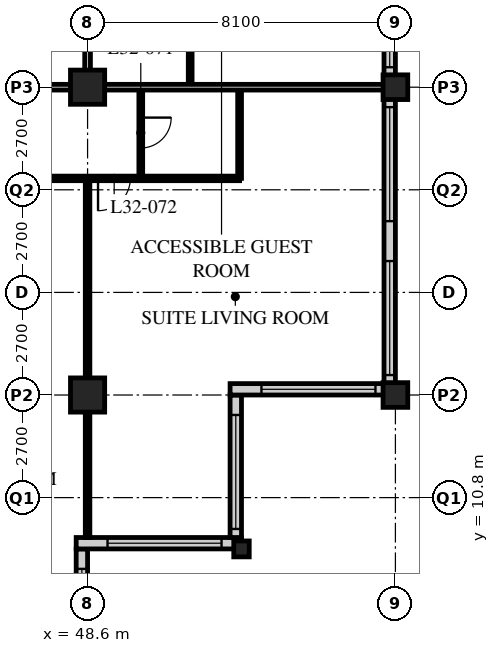
"""IFC4 building model, lengths in metres.
Left out: names, types, materials, properties, quantities, classifications, styles, units other than length and angle.
Written with IfcOpenShell. Run it as: python <this file> out.ifc"""

import sys

from ifc_helpers import new_model, si_unit, direction, frame, frame_2d, origin, origin_2d, place, context, subcontext, project, spatial, rectangle, hollow_rectangle, i_section, extrude, element, fill, save


model = new_model("IFC4")
c1 = context("Model", 3, precision=1e-05, world=origin(), true_north=direction((0.0, 1.0)))
c2 = subcontext(c1, "Body", "Model", "MODEL_VIEW")
j1 = project(units=[si_unit("LENGTHUNIT", "METRE"), si_unit("PLANEANGLEUNIT", "RADIAN")], contexts=[c1])
p1 = place(None, origin())
s1 = spatial("IfcSite", under=j1, at=p1, CompositionType="ELEMENT")
p2 = place(p1, origin())
s2 = spatial("IfcBuilding", under=s1, at=p2, CompositionType="ELEMENT")
p3 = place(p2, frame((0.0, 0.0, 127.2)))
s3 = spatial("IfcBuildingStorey", under=s2, at=p3, CompositionType="ELEMENT", Elevation=127.2)
for number, where, z_axis, x_axis in (
    (1, (48.6, 13.5, 0.0), (0.0, 0.0, 1.0), (1.0, 0.0, 0.0)),
    (2, (48.6, 21.6, 0.0), (0.0, 0.0, 1.0), (1.0, 0.0, 0.0)),
):
    element("IfcColumn", number, at=place(p3, frame(where, z_axis=z_axis, x_axis=x_axis)), inside=s3, PredefinedType="COLUMN", context=c2, shape_type="SweptSolid", body=[
        extrude(hollow_rectangle(XDim=0.9, YDim=0.9, WallThickness=0.09, at=origin_2d()), origin(), (0.0, 0.0, 1.0), 3.4),
    ])
p4 = place(p3, frame((52.65, 9.45, 0.0), z_axis=(0.0, 0.0, 1.0), x_axis=(1.0, 0.0, 0.0)))
e3 = element("IfcColumn", 3, at=p4, inside=s3, PredefinedType="COLUMN", context=c2, shape_type="SweptSolid", body=[
    extrude(i_section(OverallWidth=0.407, OverallDepth=0.419, WebThickness=0.031, FlangeThickness=0.049, FilletRadius=0.015, at=origin_2d()), origin(), (0.0, 0.0, 1.0), 3.4),
])
for number, where, z_axis, x_axis in (
    (4, (56.7, 13.5, 0.0), (0.0, 0.0, 1.0), (1.0, 0.0, 0.0)),
    (5, (56.7, 21.6, 0.0), (0.0, 0.0, 1.0), (1.0, 0.0, 0.0)),
):
    element("IfcColumn", number, at=place(p3, frame(where, z_axis=z_axis, x_axis=x_axis)), inside=s3, PredefinedType="COLUMN", context=c2, shape_type="SweptSolid", body=[
        extrude(hollow_rectangle(XDim=0.65, YDim=0.65, WallThickness=0.055, at=origin_2d()), origin(), (0.0, 0.0, 1.0), 3.4),
    ])
p5 = place(p3, frame((48.45, 5.7, 0.0), z_axis=(0.0, 0.0, 1.0), x_axis=(0.0, 1.0, 0.0)))
e6 = element("IfcWall", 6, at=p5, inside=s3, PredefinedType="SOLIDWALL", context=c2, shape_type="SweptSolid", body=[
    extrude(rectangle(XDim=3.75, YDim=0.3, at=frame_2d((1.875, 0.0))), origin(), (0.0, 0.0, 1.0), 3.19),
])
p6 = place(p5, frame((0.225, 0.0, 0.9)))
e7 = element("IfcOpeningElement", 7, at=p6, cuts=e6, PredefinedType="OPENING", context=c2, shape_type="SweptSolid", body=[
    extrude(rectangle(XDim=3.0, YDim=1.5, at=frame_2d((1.5, 0.75))), frame((0.0, 0.16, 0.0), z_axis=(0.0, -1.0, 0.0), x_axis=(1.0, 0.0, 0.0)), (0.0, 0.0, 1.0), 0.32),
])
p7 = place(p3, frame((48.3, 9.6, 0.0), z_axis=(0.0, 0.0, 1.0), x_axis=(1.0, 0.0, 0.0)))
e8 = element("IfcWall", 8, at=p7, inside=s3, PredefinedType="SOLIDWALL", context=c2, shape_type="SweptSolid", body=[
    extrude(rectangle(XDim=4.35, YDim=0.3, at=frame_2d((2.175, 0.0))), origin(), (0.0, 0.0, 1.0), 3.19),
])
p8 = place(p7, frame((0.825, 0.0, 0.9)))
e9 = element("IfcOpeningElement", 9, at=p8, cuts=e8, PredefinedType="OPENING", context=c2, shape_type="SweptSolid", body=[
    extrude(rectangle(XDim=3.0, YDim=1.5, at=frame_2d((1.5, 0.75))), frame((0.0, 0.16, 0.0), z_axis=(0.0, -1.0, 0.0), x_axis=(1.0, 0.0, 0.0)), (0.0, 0.0, 1.0), 0.32),
])
p9 = place(p3, frame((52.5, 9.75, 0.0), z_axis=(0.0, 0.0, 1.0), x_axis=(0.0, 1.0, 0.0)))
e10 = element("IfcWall", 10, at=p9, inside=s3, PredefinedType="SOLIDWALL", context=c2, shape_type="SweptSolid", body=[
    extrude(rectangle(XDim=3.75, YDim=0.3, at=frame_2d((1.875, 0.0))), origin(), (0.0, 0.0, 1.0), 3.19),
])
p10 = place(p9, frame((0.225, 0.0, 0.9)))
e11 = element("IfcOpeningElement", 11, at=p10, cuts=e10, PredefinedType="OPENING", context=c2, shape_type="SweptSolid", body=[
    extrude(rectangle(XDim=3.0, YDim=1.5, at=frame_2d((1.5, 0.75))), frame((0.0, 0.16, 0.0), z_axis=(0.0, -1.0, 0.0), x_axis=(1.0, 0.0, 0.0)), (0.0, 0.0, 1.0), 0.32),
])
p11 = place(p3, frame((52.35, 13.65, 0.0), z_axis=(0.0, 0.0, 1.0), x_axis=(1.0, 0.0, 0.0)))
e12 = element("IfcWall", 12, at=p11, inside=s3, PredefinedType="SOLIDWALL", context=c2, shape_type="SweptSolid", body=[
    extrude(rectangle(XDim=4.35, YDim=0.3, at=frame_2d((2.175, 0.0))), origin(), (0.0, 0.0, 1.0), 3.19),
])
p12 = place(p11, frame((0.825, 0.0, 0.9)))
e13 = element("IfcOpeningElement", 13, at=p12, cuts=e12, PredefinedType="OPENING", context=c2, shape_type="SweptSolid", body=[
    extrude(rectangle(XDim=3.0, YDim=1.5, at=frame_2d((1.5, 0.75))), frame((0.0, 0.16, 0.0), z_axis=(0.0, -1.0, 0.0), x_axis=(1.0, 0.0, 0.0)), (0.0, 0.0, 1.0), 0.32),
])
p13 = place(p3, frame((56.55, 13.8, 0.0), z_axis=(0.0, 0.0, 1.0), x_axis=(0.0, 1.0, 0.0)))
e14 = element("IfcWall", 14, at=p13, inside=s3, PredefinedType="SOLIDWALL", context=c2, shape_type="SweptSolid", body=[
    extrude(rectangle(XDim=32.1, YDim=0.3, at=frame_2d((16.05, 0.0))), origin(), (0.0, 0.0, 1.0), 3.19),
])
p14 = place(p13, frame((0.225, 0.0, 0.9)))
e15 = element("IfcOpeningElement", 15, at=p14, cuts=e14, PredefinedType="OPENING", context=c2, shape_type="SweptSolid", body=[
    extrude(rectangle(XDim=3.0, YDim=2.0, at=frame_2d((1.5, 1.0))), frame((0.0, 0.16, 0.0), z_axis=(0.0, -1.0, 0.0), x_axis=(1.0, 0.0, 0.0)), (0.0, 0.0, 1.0), 0.32),
])
p15 = place(p13, frame((4.275, 0.0, 0.9)))
e16 = element("IfcOpeningElement", 16, at=p15, cuts=e14, PredefinedType="OPENING", context=c2, shape_type="SweptSolid", body=[
    extrude(rectangle(XDim=3.0, YDim=2.0, at=frame_2d((1.5, 1.0))), frame((0.0, 0.16, 0.0), z_axis=(0.0, -1.0, 0.0), x_axis=(1.0, 0.0, 0.0)), (0.0, 0.0, 1.0), 0.32),
])
p16 = place(p13, frame((8.325, 0.0, 0.9)))
e17 = element("IfcOpeningElement", 17, at=p16, cuts=e14, PredefinedType="OPENING", context=c2, shape_type="SweptSolid", body=[
    extrude(rectangle(XDim=3.0, YDim=2.0, at=frame_2d((1.5, 1.0))), frame((0.0, 0.16, 0.0), z_axis=(0.0, -1.0, 0.0), x_axis=(1.0, 0.0, 0.0)), (0.0, 0.0, 1.0), 0.32),
])
p17 = place(p13, frame((12.375, 0.0, 0.9)))
e18 = element("IfcOpeningElement", 18, at=p17, cuts=e14, PredefinedType="OPENING", context=c2, shape_type="SweptSolid", body=[
    extrude(rectangle(XDim=3.0, YDim=2.0, at=frame_2d((1.5, 1.0))), frame((0.0, 0.16, 0.0), z_axis=(0.0, -1.0, 0.0), x_axis=(1.0, 0.0, 0.0)), (0.0, 0.0, 1.0), 0.32),
])
p18 = place(p13, frame((16.425, 0.0, 0.9)))
e19 = element("IfcOpeningElement", 19, at=p18, cuts=e14, PredefinedType="OPENING", context=c2, shape_type="SweptSolid", body=[
    extrude(rectangle(XDim=3.0, YDim=2.0, at=frame_2d((1.5, 1.0))), frame((0.0, 0.16, 0.0), z_axis=(0.0, -1.0, 0.0), x_axis=(1.0, 0.0, 0.0)), (0.0, 0.0, 1.0), 0.32),
])
p19 = place(p13, frame((20.475, 0.0, 0.9)))
e20 = element("IfcOpeningElement", 20, at=p19, cuts=e14, PredefinedType="OPENING", context=c2, shape_type="SweptSolid", body=[
    extrude(rectangle(XDim=3.0, YDim=2.0, at=frame_2d((1.5, 1.0))), frame((0.0, 0.16, 0.0), z_axis=(0.0, -1.0, 0.0), x_axis=(1.0, 0.0, 0.0)), (0.0, 0.0, 1.0), 0.32),
])
p20 = place(p13, frame((24.525, 0.0, 0.9)))
e21 = element("IfcOpeningElement", 21, at=p20, cuts=e14, PredefinedType="OPENING", context=c2, shape_type="SweptSolid", body=[
    extrude(rectangle(XDim=3.0, YDim=2.0, at=frame_2d((1.5, 1.0))), frame((0.0, 0.16, 0.0), z_axis=(0.0, -1.0, 0.0), x_axis=(1.0, 0.0, 0.0)), (0.0, 0.0, 1.0), 0.32),
])
p21 = place(p13, frame((28.575, 0.0, 0.9)))
e22 = element("IfcOpeningElement", 22, at=p21, cuts=e14, PredefinedType="OPENING", context=c2, shape_type="SweptSolid", body=[
    extrude(rectangle(XDim=3.0, YDim=2.0, at=frame_2d((1.5, 1.0))), frame((0.0, 0.16, 0.0), z_axis=(0.0, -1.0, 0.0), x_axis=(1.0, 0.0, 0.0)), (0.0, 0.0, 1.0), 0.32),
])
p22 = place(p3, frame((8.1, 21.6, 0.0), z_axis=(0.0, 0.0, 1.0), x_axis=(1.0, 0.0, 0.0)))
e23 = element("IfcWall", 23, at=p22, inside=s3, PredefinedType="PARTITIONING", context=c2, shape_type="SweptSolid", body=[
    extrude(rectangle(XDim=40.5, YDim=0.15, at=frame_2d((20.25, 0.0))), origin(), (0.0, 0.0, 1.0), 2.578),
])
p23 = place(p22, frame((9.625, 0.0, 0.0)))
e24 = element("IfcOpeningElement", 24, at=p23, cuts=e23, PredefinedType="OPENING", context=c2, shape_type="SweptSolid", body=[
    extrude(rectangle(XDim=1.0, YDim=2.1, at=frame_2d((0.5, 1.05))), frame((0.0, 0.085, 0.0), z_axis=(0.0, -1.0, 0.0), x_axis=(1.0, 0.0, 0.0)), (0.0, 0.0, 1.0), 0.17),
])
p24 = place(p22, frame((21.775, 0.0, 0.0)))
e25 = element("IfcOpeningElement", 25, at=p24, cuts=e23, PredefinedType="OPENING", context=c2, shape_type="SweptSolid", body=[
    extrude(rectangle(XDim=1.0, YDim=2.1, at=frame_2d((0.5, 1.05))), frame((0.0, 0.085, 0.0), z_axis=(0.0, -1.0, 0.0), x_axis=(1.0, 0.0, 0.0)), (0.0, 0.0, 1.0), 0.17),
])
p25 = place(p22, frame((28.95, 0.0, 0.0)))
e26 = element("IfcOpeningElement", 26, at=p25, cuts=e23, PredefinedType="OPENING", context=c2, shape_type="SweptSolid", body=[
    extrude(rectangle(XDim=1.0, YDim=2.1, at=frame_2d((0.5, 1.05))), frame((0.0, 0.085, 0.0), z_axis=(0.0, -1.0, 0.0), x_axis=(1.0, 0.0, 0.0)), (0.0, 0.0, 1.0), 0.17),
])
p26 = place(p22, frame((34.85, 0.0, 0.0)))
e27 = element("IfcOpeningElement", 27, at=p26, cuts=e23, PredefinedType="OPENING", context=c2, shape_type="SweptSolid", body=[
    extrude(rectangle(XDim=1.0, YDim=2.1, at=frame_2d((0.5, 1.05))), frame((0.0, 0.085, 0.0), z_axis=(0.0, -1.0, 0.0), x_axis=(1.0, 0.0, 0.0)), (0.0, 0.0, 1.0), 0.17),
])
p27 = place(p22, frame((1.525, 0.0, 0.0)))
e28 = element("IfcOpeningElement", 28, at=p27, cuts=e23, PredefinedType="OPENING", context=c2, shape_type="SweptSolid", body=[
    extrude(rectangle(XDim=1.0, YDim=2.1, at=frame_2d((0.5, 1.05))), frame((0.0, 0.085, 0.0), z_axis=(0.0, -1.0, 0.0), x_axis=(1.0, 0.0, 0.0)), (0.0, 0.0, 1.0), 0.17),
])
p28 = place(p22, frame((37.975, 0.0, 0.0)))
e29 = element("IfcOpeningElement", 29, at=p28, cuts=e23, PredefinedType="OPENING", context=c2, shape_type="SweptSolid", body=[
    extrude(rectangle(XDim=1.0, YDim=2.1, at=frame_2d((0.5, 1.05))), frame((0.0, 0.085, 0.0), z_axis=(0.0, -1.0, 0.0), x_axis=(1.0, 0.0, 0.0)), (0.0, 0.0, 1.0), 0.17),
])
p29 = place(p3, frame((48.6, 21.6, 0.0), z_axis=(0.0, 0.0, 1.0), x_axis=(0.0, 1.0, 0.0)))
e30 = element("IfcWall", 30, at=p29, inside=s3, PredefinedType="PARTITIONING", context=c2, shape_type="SweptSolid", body=[
    extrude(rectangle(XDim=24.3, YDim=0.15, at=frame_2d((12.15, 0.0))), origin(), (0.0, 0.0, 1.0), 2.578),
])
p30 = place(p29, frame((2.75, 0.0, 0.0)))
e31 = element("IfcOpeningElement", 31, at=p30, cuts=e30, PredefinedType="OPENING", context=c2, shape_type="SweptSolid", body=[
    extrude(rectangle(XDim=1.0, YDim=2.1, at=frame_2d((0.5, 1.05))), frame((0.0, 0.085, 0.0), z_axis=(0.0, -1.0, 0.0), x_axis=(1.0, 0.0, 0.0)), (0.0, 0.0, 1.0), 0.17),
])
p31 = place(p29, frame((4.65, 0.0, 0.0)))
e32 = element("IfcOpeningElement", 32, at=p31, cuts=e30, PredefinedType="OPENING", context=c2, shape_type="SweptSolid", body=[
    extrude(rectangle(XDim=1.0, YDim=2.1, at=frame_2d((0.5, 1.05))), frame((0.0, 0.085, 0.0), z_axis=(0.0, -1.0, 0.0), x_axis=(1.0, 0.0, 0.0)), (0.0, 0.0, 1.0), 0.17),
])
p32 = place(p29, frame((10.0, 0.0, 0.0)))
e33 = element("IfcOpeningElement", 33, at=p32, cuts=e30, PredefinedType="OPENING", context=c2, shape_type="SweptSolid", body=[
    extrude(rectangle(XDim=1.0, YDim=2.1, at=frame_2d((0.5, 1.05))), frame((0.0, 0.085, 0.0), z_axis=(0.0, -1.0, 0.0), x_axis=(1.0, 0.0, 0.0)), (0.0, 0.0, 1.0), 0.17),
])
p33 = place(p29, frame((18.1, 0.0, 0.0)))
e34 = element("IfcOpeningElement", 34, at=p33, cuts=e30, PredefinedType="OPENING", context=c2, shape_type="SweptSolid", body=[
    extrude(rectangle(XDim=1.0, YDim=2.1, at=frame_2d((0.5, 1.05))), frame((0.0, 0.085, 0.0), z_axis=(0.0, -1.0, 0.0), x_axis=(1.0, 0.0, 0.0)), (0.0, 0.0, 1.0), 0.17),
])
p34 = place(p3, frame((51.3, 21.6, 0.0), z_axis=(0.0, 0.0, 1.0), x_axis=(0.0, 1.0, 0.0)))
e35 = element("IfcWall", 35, at=p34, inside=s3, PredefinedType="PARTITIONING", context=c2, shape_type="SweptSolid", body=[
    extrude(rectangle(XDim=2.6, YDim=0.1, at=frame_2d((1.3, 0.0))), origin(), (0.0, 0.0, 1.0), 3.19),
])
p35 = place(p3, frame((44.55, 19.2, 0.0), z_axis=(0.0, 0.0, 1.0), x_axis=(1.0, 0.0, 0.0)))
e36 = element("IfcWall", 36, at=p35, inside=s3, PredefinedType="PARTITIONING", context=c2, shape_type="SweptSolid", body=[
    extrude(rectangle(XDim=8.05, YDim=0.12, at=frame_2d((4.025, 0.0))), origin(), (0.0, 0.0, 1.0), 3.19),
])
p36 = place(p35, frame((0.475, 0.0, 0.0)))
e37 = element("IfcOpeningElement", 37, at=p36, cuts=e36, PredefinedType="OPENING", context=c2, shape_type="SweptSolid", body=[
    extrude(rectangle(XDim=0.85, YDim=2.1, at=frame_2d((0.425, 1.05))), frame((0.0, 0.07, 0.0), z_axis=(0.0, -1.0, 0.0), x_axis=(1.0, 0.0, 0.0)), (0.0, 0.0, 1.0), 0.14),
])
p37 = place(p35, frame((4.325, 0.0, 0.0)))
e38 = element("IfcOpeningElement", 38, at=p37, cuts=e36, PredefinedType="OPENING", context=c2, shape_type="SweptSolid", body=[
    extrude(rectangle(XDim=0.85, YDim=2.1, at=frame_2d((0.425, 1.05))), frame((0.0, 0.07, 0.0), z_axis=(0.0, -1.0, 0.0), x_axis=(1.0, 0.0, 0.0)), (0.0, 0.0, 1.0), 0.14),
])
p38 = place(p3, frame((50.0, 21.6, 0.0), z_axis=(0.0, 0.0, 1.0), x_axis=(0.0, -1.0, 0.0)))
e39 = element("IfcWall", 39, at=p38, inside=s3, PredefinedType="PARTITIONING", context=c2, shape_type="SweptSolid", body=[
    extrude(rectangle(XDim=2.4, YDim=0.1, at=frame_2d((1.2, 0.0))), origin(), (0.0, 0.0, 1.0), 3.19),
])
p39 = place(p38, frame((0.8, 0.0, 0.0)))
e40 = element("IfcOpeningElement", 40, at=p39, cuts=e39, PredefinedType="OPENING", context=c2, shape_type="SweptSolid", body=[
    extrude(rectangle(XDim=0.8, YDim=2.1, at=frame_2d((0.4, 1.05))), frame((0.0, 0.06, 0.0), z_axis=(0.0, -1.0, 0.0), x_axis=(1.0, 0.0, 0.0)), (0.0, 0.0, 1.0), 0.12),
])
p40 = place(p3, frame((52.6, 21.6, 0.0), z_axis=(0.0, 0.0, 1.0), x_axis=(0.0, -1.0, 0.0)))
e41 = element("IfcWall", 41, at=p40, inside=s3, PredefinedType="PARTITIONING", context=c2, shape_type="SweptSolid", body=[
    extrude(rectangle(XDim=2.4, YDim=0.1, at=frame_2d((1.2, 0.0))), origin(), (0.0, 0.0, 1.0), 3.19),
])
p41 = place(p3, frame((48.6, 19.2, 0.0), z_axis=(0.0, 0.0, 1.0), x_axis=(0.0, -1.0, 0.0)))
e42 = element("IfcWall", 42, at=p41, inside=s3, PredefinedType="PARTITIONING", context=c2, shape_type="SweptSolid", body=[
    extrude(rectangle(XDim=9.45, YDim=0.12, at=frame_2d((4.725, 0.0))), origin(), (0.0, 0.0, 1.0), 2.578),
])
p42 = place(p3, frame((48.6, 21.6, 0.0), z_axis=(0.0, 0.0, 1.0), x_axis=(1.0, 0.0, 0.0)))
e43 = element("IfcWall", 43, at=p42, inside=s3, PredefinedType="PARTITIONING", context=c2, shape_type="SweptSolid", body=[
    extrude(rectangle(XDim=7.8, YDim=0.15, at=frame_2d((3.9, 0.0))), origin(), (0.0, 0.0, 1.0), 2.578),
])
p43 = place(p6, origin())
e44 = element("IfcWindow", 44, at=p43, inside=s3, PartitioningType="SINGLE_PANEL", PredefinedType="WINDOW", context=c2, shape_type="SweptSolid", body=[
    extrude(rectangle(XDim=3.0, YDim=1.5, at=frame_2d((1.5, 0.75))), frame((0.0, 0.03, 0.0), z_axis=(0.0, -1.0, 0.0), x_axis=(1.0, 0.0, 0.0)), (0.0, 0.0, 1.0), 0.06),
])
fill(e7, e44)
p44 = place(p8, origin())
e45 = element("IfcWindow", 45, at=p44, inside=s3, PartitioningType="SINGLE_PANEL", PredefinedType="WINDOW", context=c2, shape_type="SweptSolid", body=[
    extrude(rectangle(XDim=3.0, YDim=1.5, at=frame_2d((1.5, 0.75))), frame((0.0, 0.03, 0.0), z_axis=(0.0, -1.0, 0.0), x_axis=(1.0, 0.0, 0.0)), (0.0, 0.0, 1.0), 0.06),
])
fill(e9, e45)
p45 = place(p10, origin())
e46 = element("IfcWindow", 46, at=p45, inside=s3, PartitioningType="SINGLE_PANEL", PredefinedType="WINDOW", context=c2, shape_type="SweptSolid", body=[
    extrude(rectangle(XDim=3.0, YDim=1.5, at=frame_2d((1.5, 0.75))), frame((0.0, 0.03, 0.0), z_axis=(0.0, -1.0, 0.0), x_axis=(1.0, 0.0, 0.0)), (0.0, 0.0, 1.0), 0.06),
])
fill(e11, e46)
p46 = place(p12, origin())
e47 = element("IfcWindow", 47, at=p46, inside=s3, PartitioningType="SINGLE_PANEL", PredefinedType="WINDOW", context=c2, shape_type="SweptSolid", body=[
    extrude(rectangle(XDim=3.0, YDim=1.5, at=frame_2d((1.5, 0.75))), frame((0.0, 0.03, 0.0), z_axis=(0.0, -1.0, 0.0), x_axis=(1.0, 0.0, 0.0)), (0.0, 0.0, 1.0), 0.06),
])
fill(e13, e47)
p47 = place(p14, origin())
e48 = element("IfcWindow", 48, at=p47, inside=s3, PartitioningType="SINGLE_PANEL", PredefinedType="WINDOW", context=c2, shape_type="SweptSolid", body=[
    extrude(rectangle(XDim=3.0, YDim=2.0, at=frame_2d((1.5, 1.0))), frame((0.0, 0.03, 0.0), z_axis=(0.0, -1.0, 0.0), x_axis=(1.0, 0.0, 0.0)), (0.0, 0.0, 1.0), 0.06),
])
fill(e15, e48)
p48 = place(p15, origin())
e49 = element("IfcWindow", 49, at=p48, inside=s3, PartitioningType="SINGLE_PANEL", PredefinedType="WINDOW", context=c2, shape_type="SweptSolid", body=[
    extrude(rectangle(XDim=3.0, YDim=2.0, at=frame_2d((1.5, 1.0))), frame((0.0, 0.03, 0.0), z_axis=(0.0, -1.0, 0.0), x_axis=(1.0, 0.0, 0.0)), (0.0, 0.0, 1.0), 0.06),
])
fill(e16, e49)
p49 = place(p16, origin())
e50 = element("IfcWindow", 50, at=p49, inside=s3, PartitioningType="SINGLE_PANEL", PredefinedType="WINDOW", context=c2, shape_type="SweptSolid", body=[
    extrude(rectangle(XDim=3.0, YDim=2.0, at=frame_2d((1.5, 1.0))), frame((0.0, 0.03, 0.0), z_axis=(0.0, -1.0, 0.0), x_axis=(1.0, 0.0, 0.0)), (0.0, 0.0, 1.0), 0.06),
])
fill(e17, e50)
p50 = place(p39, origin())
e51 = element("IfcDoor", 51, at=p50, inside=s3, OperationType="SINGLE_SWING_LEFT", PredefinedType="DOOR", context=c2, shape_type="SweptSolid", body=[
    extrude(rectangle(XDim=0.8, YDim=2.1, at=frame_2d((0.4, 1.05))), frame((0.0, 0.025, 0.0), z_axis=(0.0, -1.0, 0.0), x_axis=(1.0, 0.0, 0.0)), (0.0, 0.0, 1.0), 0.05),
])
fill(e40, e51)
p51 = place(p37, origin())
e52 = element("IfcDoor", 52, at=p51, inside=s3, OperationType="SINGLE_SWING_RIGHT", PredefinedType="DOOR", context=c2, shape_type="SweptSolid", body=[
    extrude(rectangle(XDim=0.85, YDim=2.1, at=frame_2d((0.425, 1.05))), frame((0.0, 0.025, 0.0), z_axis=(0.0, -1.0, 0.0), x_axis=(1.0, 0.0, 0.0)), (0.0, 0.0, 1.0), 0.05),
])
fill(e38, e52)
save(model, sys.argv[1])
